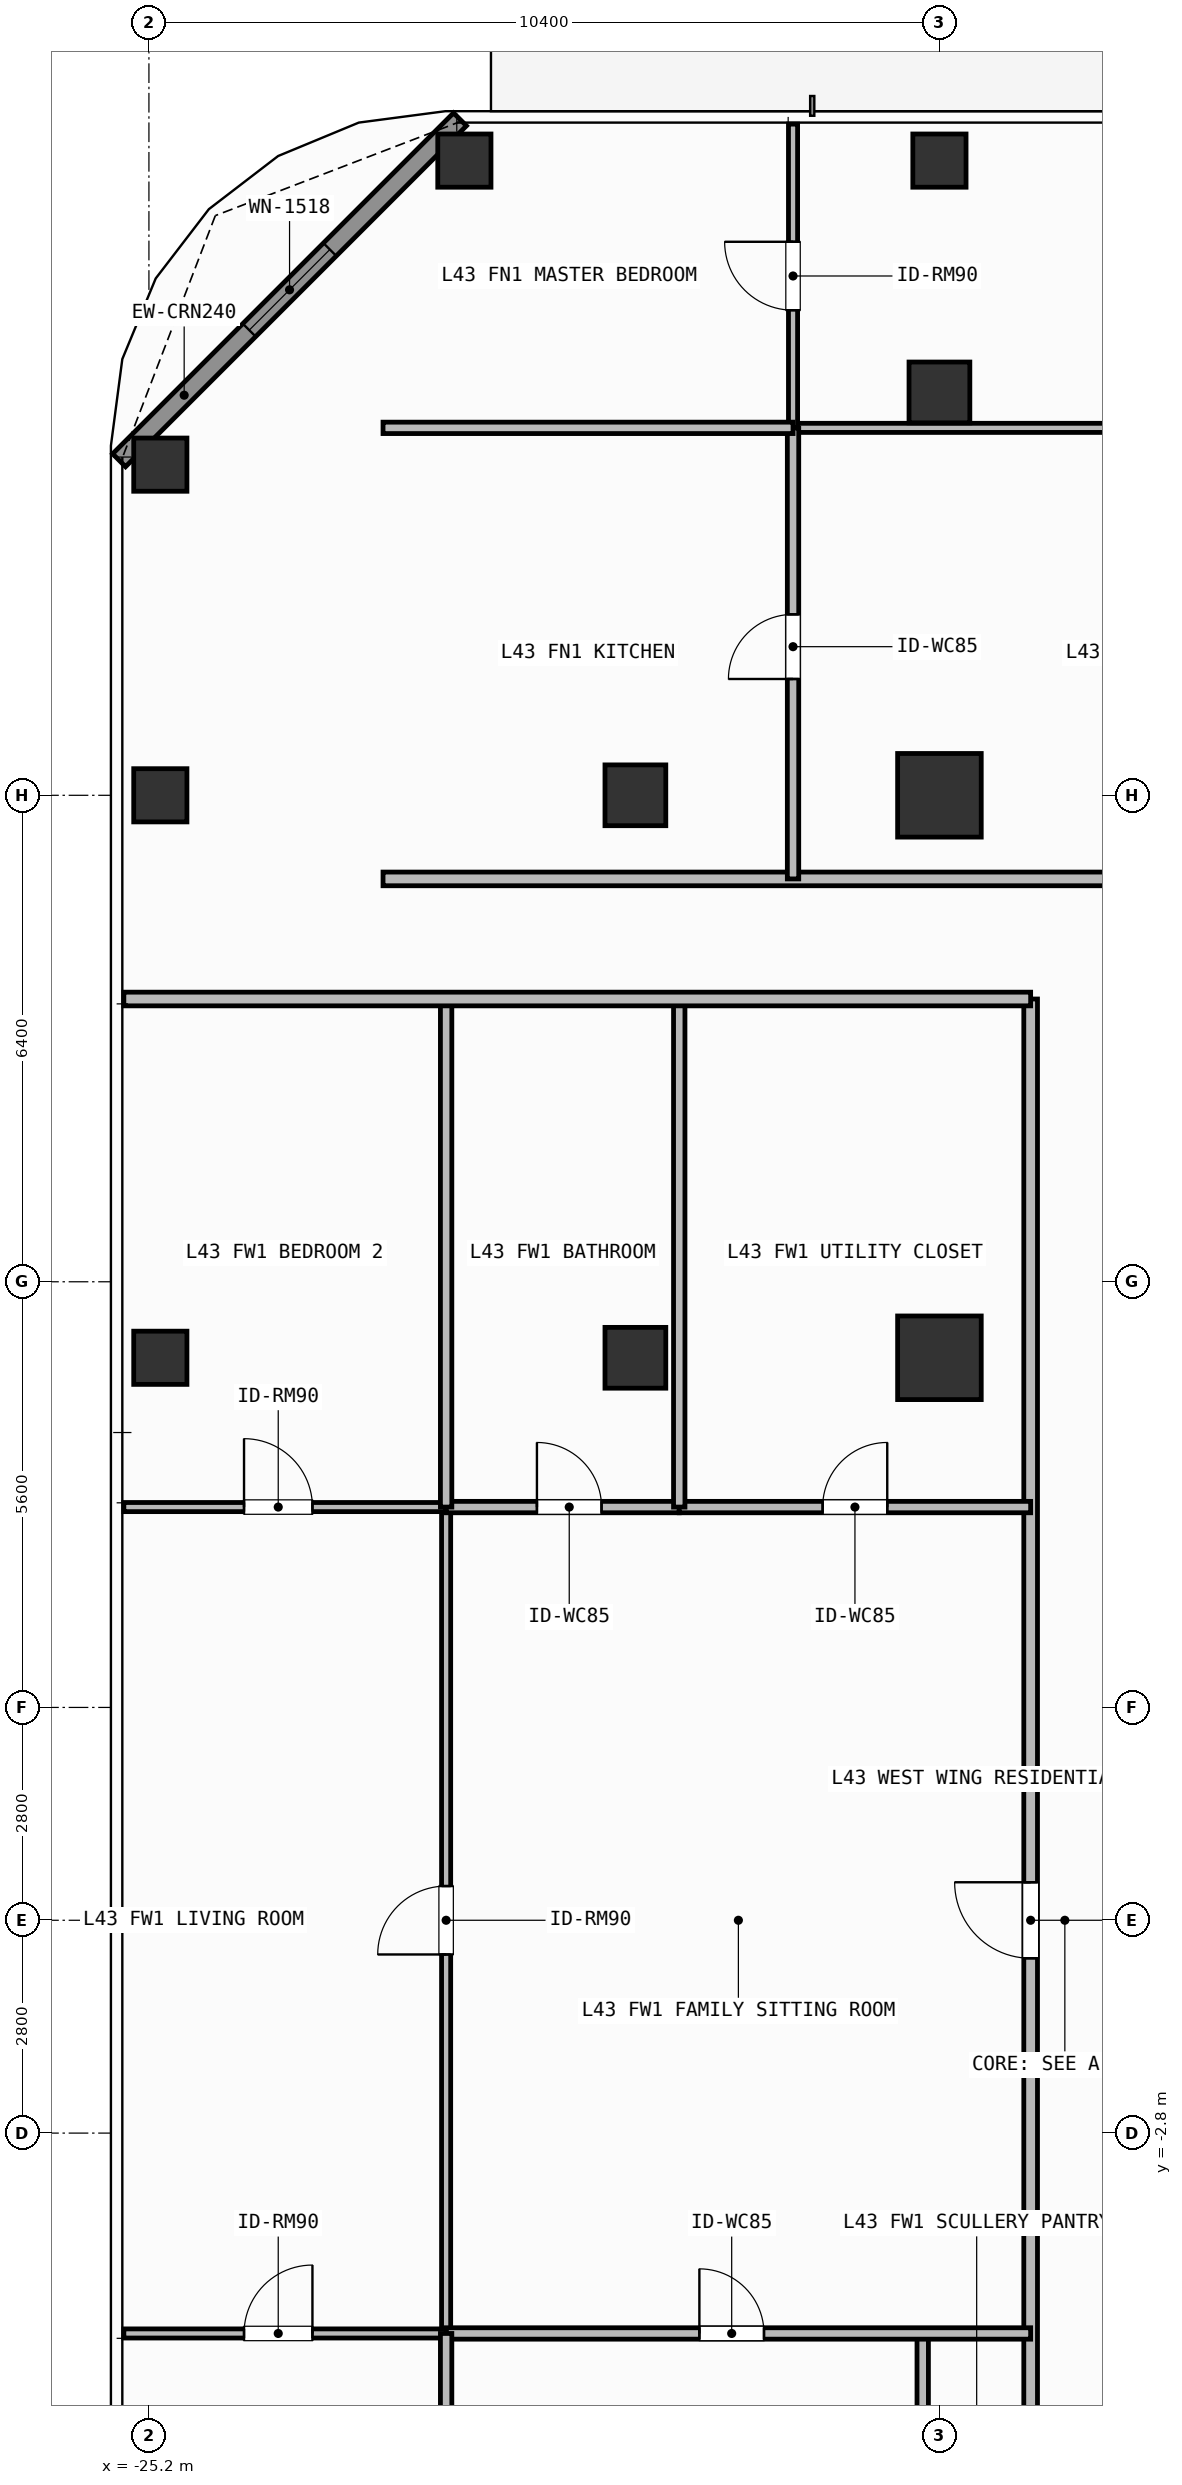
"""IFC4 building model, lengths in metres.
Left out: names, types, materials, properties, quantities, classifications, styles, units other than length and angle.
Written with IfcOpenShell. Run it as: python <this file> out.ifc"""

import sys

from ifc_helpers import new_model, si_unit, direction, frame, frame_2d, origin, origin_2d, place, context, subcontext, project, spatial, rectangle, hollow_rectangle, extrude, element, fill, save


model = new_model("IFC4")
c1 = context("Model", 3, precision=1e-05, world=origin(), true_north=direction((0.0, 1.0)))
c2 = subcontext(c1, "Body", "Model", "MODEL_VIEW")
j1 = project(units=[si_unit("LENGTHUNIT", "METRE"), si_unit("PLANEANGLEUNIT", "RADIAN")], contexts=[c1])
p1 = place(None, origin())
s1 = spatial("IfcSite", under=j1, at=p1, CompositionType="ELEMENT")
p2 = place(p1, origin())
s2 = spatial("IfcBuilding", under=s1, at=p2, CompositionType="ELEMENT")
p3 = place(p2, frame((0.0, 0.0, 175.8)))
s3 = spatial("IfcBuildingStorey", under=s2, at=p3, CompositionType="ELEMENT", Elevation=175.8)
for number, where, z_axis, x_axis in (
    (1, (-14.8, 14.8, 0.0), (0.0, 0.0, 1.0), (1.0, 0.0, 0.0)),
    (2, (-14.8, 7.4, 0.0), (0.0, 0.0, 1.0), (1.0, 0.0, 0.0)),
):
    element("IfcColumn", number, at=place(p3, frame(where, z_axis=z_axis, x_axis=x_axis)), inside=s3, PredefinedType="COLUMN", context=c2, shape_type="SweptSolid", body=[
        extrude(rectangle(XDim=1.1, YDim=1.1, at=origin_2d()), origin(), (0.0, 0.0, 1.0), 3.9),
    ])
for number, where, z_axis, x_axis in (
    (3, (-18.8, 7.4, 0.0), (0.0, 0.0, 1.0), (1.0, 0.0, 0.0)),
    (4, (-18.8, 14.8, 0.0), (0.0, 0.0, 1.0), (1.0, 0.0, 0.0)),
    (5, (-14.8, 20.1, 0.0), (0.0, 0.0, 1.0), (1.0, 0.0, 0.0)),
):
    element("IfcColumn", number, at=place(p3, frame(where, z_axis=z_axis, x_axis=x_axis)), inside=s3, PredefinedType="COLUMN", context=c2, shape_type="SweptSolid", body=[
        extrude(hollow_rectangle(XDim=0.8, YDim=0.8, WallThickness=0.036, at=origin_2d()), origin(), (0.0, 0.0, 1.0), 3.9),
    ])
for number, where, z_axis, x_axis in (
    (6, (-21.05, 23.15, 0.0), (0.0, 0.0, 1.0), (1.0, 0.0, 0.0)),
    (7, (-25.05, 19.15, 0.0), (0.0, 0.0, 1.0), (1.0, 0.0, 0.0)),
    (8, (-14.8, 23.15, 0.0), (0.0, 0.0, 1.0), (1.0, 0.0, 0.0)),
    (9, (-25.05, 7.4, 0.0), (0.0, 0.0, 1.0), (1.0, 0.0, 0.0)),
    (10, (-25.05, 14.8, 0.0), (0.0, 0.0, 1.0), (1.0, 0.0, 0.0)),
):
    element("IfcColumn", number, at=place(p3, frame(where, z_axis=z_axis, x_axis=x_axis)), inside=s3, PredefinedType="COLUMN", context=c2, shape_type="SweptSolid", body=[
        extrude(hollow_rectangle(XDim=0.7, YDim=0.7, WallThickness=0.032, at=origin_2d()), origin(), (0.0, 0.0, 1.0), 3.9),
    ])
p4 = place(p3, frame((-25.592, 19.208, 0.0), z_axis=(0.0, 0.0, 1.0), x_axis=(0.707087534163, 0.707126027686, 0.0)))
e11 = element("IfcWall", 11, at=p4, inside=s3, PredefinedType="SOLIDWALL", context=c2, shape_type="SweptSolid", body=[
    extrude(rectangle(XDim=6.342, YDim=0.24, at=frame_2d((3.171, 0.0))), origin(), (0.0, 0.0, 1.0), 3.68),
])
p5 = place(p4, frame((2.421, 0.0, 0.8)))
e12 = element("IfcOpeningElement", 12, at=p5, cuts=e11, PredefinedType="OPENING", context=c2, shape_type="SweptSolid", body=[
    extrude(rectangle(XDim=1.5, YDim=1.85, at=frame_2d((0.75, 0.925))), frame((0.0, 0.13, 0.0), z_axis=(0.0, -1.0, 0.0), x_axis=(1.0, 0.0, 0.0)), (0.0, 0.0, 1.0), 0.26),
])
p6 = place(p3, frame((-22.12, 13.7, 0.0), z_axis=(0.0, 0.0, 1.0), x_axis=(1.0, 0.0, 0.0)))
e13 = element("IfcWall", 13, at=p6, inside=s3, PredefinedType="PARTITIONING", context=c2, shape_type="SweptSolid", body=[
    extrude(rectangle(XDim=22.646, YDim=0.18, at=frame_2d((11.323, 0.0))), origin(), (0.0, 0.0, 1.0), 3.68),
])
p7 = place(p6, frame((10.554, 0.0, 0.0)))
e14 = element("IfcOpeningElement", 14, at=p7, cuts=e13, PredefinedType="OPENING", context=c2, shape_type="SweptSolid", body=[
    extrude(rectangle(XDim=1.0, YDim=2.2, at=frame_2d((0.5, 1.1))), frame((0.0, 0.1, 0.0), z_axis=(0.0, -1.0, 0.0), x_axis=(1.0, 0.0, 0.0)), (0.0, 0.0, 1.0), 0.2),
])
p8 = place(p3, frame((-16.726, 19.634, 0.0), z_axis=(0.0, 0.0, 1.0), x_axis=(1.0, 0.0, 0.0)))
e15 = element("IfcWall", 15, at=p8, inside=s3, PredefinedType="PARTITIONING", context=c2, shape_type="SweptSolid", body=[
    extrude(rectangle(XDim=11.298, YDim=0.12, at=frame_2d((5.649, 0.0))), origin(), (0.0, 0.0, 1.0), 3.68),
])
p9 = place(p8, frame((5.199, 0.0, 0.0)))
e16 = element("IfcOpeningElement", 16, at=p9, cuts=e15, PredefinedType="OPENING", context=c2, shape_type="SweptSolid", body=[
    extrude(rectangle(XDim=0.9, YDim=2.1, at=frame_2d((0.45, 1.05))), frame((0.0, 0.07, 0.0), z_axis=(0.0, -1.0, 0.0), x_axis=(1.0, 0.0, 0.0)), (0.0, 0.0, 1.0), 0.14),
])
p10 = place(p3, frame((-16.726, 13.7, 0.0), z_axis=(0.0, 0.0, 1.0), x_axis=(0.0, 1.0, 0.0)))
e17 = element("IfcWall", 17, at=p10, inside=s3, PredefinedType="PARTITIONING", context=c2, shape_type="SweptSolid", body=[
    extrude(rectangle(XDim=5.934, YDim=0.15, at=frame_2d((2.967, 0.0))), origin(), (0.0, 0.0, 1.0), 3.68),
])
p11 = place(p10, frame((2.63, 0.0, 0.0)))
e18 = element("IfcOpeningElement", 18, at=p11, cuts=e17, PredefinedType="OPENING", context=c2, shape_type="SweptSolid", body=[
    extrude(rectangle(XDim=0.85, YDim=2.1, at=frame_2d((0.425, 1.05))), frame((0.0, 0.085, 0.0), z_axis=(0.0, -1.0, 0.0), x_axis=(1.0, 0.0, 0.0)), (0.0, 0.0, 1.0), 0.17),
])
p12 = place(p3, frame((-16.726, 19.634, 0.0), z_axis=(0.0, 0.0, 1.0), x_axis=(0.0, 1.0, 0.0)))
e19 = element("IfcWall", 19, at=p12, inside=s3, PredefinedType="PARTITIONING", context=c2, shape_type="SweptSolid", body=[
    extrude(rectangle(XDim=3.996, YDim=0.12, at=frame_2d((1.998, 0.0))), origin(), (0.0, 0.0, 1.0), 3.68),
])
p13 = place(p12, frame((1.548, 0.0, 0.0)))
e20 = element("IfcOpeningElement", 20, at=p13, cuts=e19, PredefinedType="OPENING", context=c2, shape_type="SweptSolid", body=[
    extrude(rectangle(XDim=0.9, YDim=2.1, at=frame_2d((0.45, 1.05))), frame((0.0, 0.07, 0.0), z_axis=(0.0, -1.0, 0.0), x_axis=(1.0, 0.0, 0.0)), (0.0, 0.0, 1.0), 0.14),
])
p14 = place(p3, frame((-13.6, -12.12, 0.0), z_axis=(0.0, 0.0, 1.0), x_axis=(0.0, 1.0, 0.0)))
e21 = element("IfcWall", 21, at=p14, inside=s3, PredefinedType="PARTITIONING", context=c2, shape_type="SweptSolid", body=[
    extrude(rectangle(XDim=24.24, YDim=0.18, at=frame_2d((12.12, 0.0))), origin(), (0.0, 0.0, 1.0), 3.68),
])
p15 = place(p14, frame((11.62, 0.0, 0.0)))
e22 = element("IfcOpeningElement", 22, at=p15, cuts=e21, PredefinedType="OPENING", context=c2, shape_type="SweptSolid", body=[
    extrude(rectangle(XDim=1.0, YDim=2.2, at=frame_2d((0.5, 1.1))), frame((0.0, 0.1, 0.0), z_axis=(0.0, -1.0, 0.0), x_axis=(1.0, 0.0, 0.0)), (0.0, 0.0, 1.0), 0.2),
])
p16 = place(p3, frame((-21.29, -5.436, 0.0), z_axis=(0.0, 0.0, 1.0), x_axis=(0.0, 1.0, 0.0)))
e23 = element("IfcWall", 23, at=p16, inside=s3, PredefinedType="PARTITIONING", context=c2, shape_type="SweptSolid", body=[
    extrude(rectangle(XDim=10.872, YDim=0.12, at=frame_2d((5.436, 0.0))), origin(), (0.0, 0.0, 1.0), 3.68),
])
p17 = place(p16, frame((4.986, 0.0, 0.0)))
e24 = element("IfcOpeningElement", 24, at=p17, cuts=e23, PredefinedType="OPENING", context=c2, shape_type="SweptSolid", body=[
    extrude(rectangle(XDim=0.9, YDim=2.1, at=frame_2d((0.45, 1.05))), frame((0.0, 0.07, 0.0), z_axis=(0.0, -1.0, 0.0), x_axis=(1.0, 0.0, 0.0)), (0.0, 0.0, 1.0), 0.14),
])
p18 = place(p3, frame((-15.02, -12.12, 0.0), z_axis=(0.0, 0.0, 1.0), x_axis=(0.0, 1.0, 0.0)))
e25 = element("IfcWall", 25, at=p18, inside=s3, PredefinedType="PARTITIONING", context=c2, shape_type="SweptSolid", body=[
    extrude(rectangle(XDim=6.684, YDim=0.15, at=frame_2d((3.342, 0.0))), origin(), (0.0, 0.0, 1.0), 3.082),
])
p19 = place(p18, frame((2.828, 0.0, 0.0)))
e26 = element("IfcOpeningElement", 26, at=p19, cuts=e25, PredefinedType="OPENING", context=c2, shape_type="SweptSolid", body=[
    extrude(rectangle(XDim=0.85, YDim=2.1, at=frame_2d((0.425, 1.05))), frame((0.0, 0.085, 0.0), z_axis=(0.0, -1.0, 0.0), x_axis=(1.0, 0.0, 0.0)), (0.0, 0.0, 1.0), 0.17),
])
p20 = place(p3, frame((-21.29, 5.436, 0.0), z_axis=(0.0, 0.0, 1.0), x_axis=(1.0, 0.0, 0.0)))
e27 = element("IfcWall", 27, at=p20, inside=s3, PredefinedType="PARTITIONING", context=c2, shape_type="SweptSolid", body=[
    extrude(rectangle(XDim=3.067, YDim=0.15, at=frame_2d((1.534, 0.0))), origin(), (0.0, 0.0, 1.0), 3.68),
])
p21 = place(p20, frame((1.195, 0.0, 0.0)))
e28 = element("IfcOpeningElement", 28, at=p21, cuts=e27, PredefinedType="OPENING", context=c2, shape_type="SweptSolid", body=[
    extrude(rectangle(XDim=0.85, YDim=2.1, at=frame_2d((0.425, 1.05))), frame((0.0, 0.085, 0.0), z_axis=(0.0, -1.0, 0.0), x_axis=(1.0, 0.0, 0.0)), (0.0, 0.0, 1.0), 0.17),
])
p22 = place(p3, frame((-18.223, 5.436, 0.0), z_axis=(0.0, 0.0, 1.0), x_axis=(1.0, 0.0, 0.0)))
e29 = element("IfcWall", 29, at=p22, inside=s3, PredefinedType="PARTITIONING", context=c2, shape_type="SweptSolid", body=[
    extrude(rectangle(XDim=4.623, YDim=0.15, at=frame_2d((2.312, 0.0))), origin(), (0.0, 0.0, 1.0), 3.68),
])
p23 = place(p22, frame((1.886, 0.0, 0.0)))
e30 = element("IfcOpeningElement", 30, at=p23, cuts=e29, PredefinedType="OPENING", context=c2, shape_type="SweptSolid", body=[
    extrude(rectangle(XDim=0.85, YDim=2.1, at=frame_2d((0.425, 1.05))), frame((0.0, 0.085, 0.0), z_axis=(0.0, -1.0, 0.0), x_axis=(1.0, 0.0, 0.0)), (0.0, 0.0, 1.0), 0.17),
])
p24 = place(p3, frame((-21.29, -5.436, 0.0), z_axis=(0.0, 0.0, 1.0), x_axis=(1.0, 0.0, 0.0)))
e31 = element("IfcWall", 31, at=p24, inside=s3, PredefinedType="PARTITIONING", context=c2, shape_type="SweptSolid", body=[
    extrude(rectangle(XDim=7.69, YDim=0.15, at=frame_2d((3.845, 0.0))), origin(), (0.0, 0.0, 1.0), 3.68),
])
p25 = place(p24, frame((3.332, 0.0, 0.0)))
e32 = element("IfcOpeningElement", 32, at=p25, cuts=e31, PredefinedType="OPENING", context=c2, shape_type="SweptSolid", body=[
    extrude(rectangle(XDim=0.85, YDim=2.1, at=frame_2d((0.425, 1.05))), frame((0.0, 0.085, 0.0), z_axis=(0.0, -1.0, 0.0), x_axis=(1.0, 0.0, 0.0)), (0.0, 0.0, 1.0), 0.17),
])
p26 = place(p3, frame((-25.53, -5.436, 0.0), z_axis=(0.0, 0.0, 1.0), x_axis=(1.0, 0.0, 0.0)))
e33 = element("IfcWall", 33, at=p26, inside=s3, PredefinedType="PARTITIONING", context=c2, shape_type="SweptSolid", body=[
    extrude(rectangle(XDim=4.24, YDim=0.12, at=frame_2d((2.12, 0.0))), origin(), (0.0, 0.0, 1.0), 3.68),
])
p27 = place(p26, frame((1.581, 0.0, 0.0)))
e34 = element("IfcOpeningElement", 34, at=p27, cuts=e33, PredefinedType="OPENING", context=c2, shape_type="SweptSolid", body=[
    extrude(rectangle(XDim=0.9, YDim=2.1, at=frame_2d((0.45, 1.05))), frame((0.0, 0.07, 0.0), z_axis=(0.0, -1.0, 0.0), x_axis=(1.0, 0.0, 0.0)), (0.0, 0.0, 1.0), 0.14),
])
p28 = place(p3, frame((-25.53, 5.436, 0.0), z_axis=(0.0, 0.0, 1.0), x_axis=(1.0, 0.0, 0.0)))
e35 = element("IfcWall", 35, at=p28, inside=s3, PredefinedType="PARTITIONING", context=c2, shape_type="SweptSolid", body=[
    extrude(rectangle(XDim=4.24, YDim=0.12, at=frame_2d((2.12, 0.0))), origin(), (0.0, 0.0, 1.0), 3.68),
])
p29 = place(p28, frame((1.581, 0.0, 0.0)))
e36 = element("IfcOpeningElement", 36, at=p29, cuts=e35, PredefinedType="OPENING", context=c2, shape_type="SweptSolid", body=[
    extrude(rectangle(XDim=0.9, YDim=2.1, at=frame_2d((0.45, 1.05))), frame((0.0, 0.07, 0.0), z_axis=(0.0, -1.0, 0.0), x_axis=(1.0, 0.0, 0.0)), (0.0, 0.0, 1.0), 0.14),
])
p30 = place(p3, frame((-22.12, 19.634, 0.0), z_axis=(0.0, 0.0, 1.0), x_axis=(1.0, 0.0, 0.0)))
e37 = element("IfcWall", 37, at=p30, inside=s3, PredefinedType="PARTITIONING", context=c2, shape_type="SweptSolid", body=[
    extrude(rectangle(XDim=5.394, YDim=0.15, at=frame_2d((2.697, 0.0))), origin(), (0.0, 0.0, 1.0), 3.68),
])
for number, where, z_axis, x_axis in (
    (38, (-18.223, 5.436, 0.0), (0.0, 0.0, 1.0), (0.0, 1.0, 0.0)),
    (39, (-21.29, -12.12, 0.0), (0.0, 0.0, 1.0), (0.0, 1.0, 0.0)),
    (40, (-21.29, 5.436, 0.0), (0.0, 0.0, 1.0), (0.0, 1.0, 0.0)),
):
    element("IfcWall", number, at=place(p3, frame(where, z_axis=z_axis, x_axis=x_axis)), inside=s3, PredefinedType="PARTITIONING", context=c2, shape_type="SweptSolid", body=[
        extrude(rectangle(XDim=6.684, YDim=0.15, at=frame_2d((3.342, 0.0))), origin(), (0.0, 0.0, 1.0), 3.68),
    ])
p31 = place(p3, frame((-25.53, 12.12, 0.0), z_axis=(0.0, 0.0, 1.0), x_axis=(1.0, 0.0, 0.0)))
e41 = element("IfcWall", 41, at=p31, inside=s3, PredefinedType="PARTITIONING", context=c2, shape_type="SweptSolid", body=[
    extrude(rectangle(XDim=11.93, YDim=0.18, at=frame_2d((5.965, 0.0))), origin(), (0.0, 0.0, 1.0), 3.68),
])
p32 = place(p5, origin())
e42 = element("IfcWindow", 42, at=p32, inside=s3, PartitioningType="SINGLE_PANEL", PredefinedType="WINDOW", context=c2, shape_type="SweptSolid", body=[
    extrude(rectangle(XDim=1.5, YDim=1.85, at=frame_2d((0.75, 0.925))), frame((0.0, 0.03, 0.0), z_axis=(0.0, -1.0, 0.0), x_axis=(1.0, 0.0, 0.0)), (0.0, 0.0, 1.0), 0.06),
])
fill(e12, e42)
p33 = place(p11, origin())
e43 = element("IfcDoor", 43, at=p33, inside=s3, OperationType="SINGLE_SWING_LEFT", PredefinedType="DOOR", context=c2, shape_type="SweptSolid", body=[
    extrude(rectangle(XDim=0.85, YDim=2.1, at=frame_2d((0.425, 1.05))), frame((0.0, 0.025, 0.0), z_axis=(0.0, -1.0, 0.0), x_axis=(1.0, 0.0, 0.0)), (0.0, 0.0, 1.0), 0.05),
])
fill(e18, e43)
p34 = place(p13, origin())
e44 = element("IfcDoor", 44, at=p34, inside=s3, OperationType="SINGLE_SWING_RIGHT", PredefinedType="DOOR", context=c2, shape_type="SweptSolid", body=[
    extrude(rectangle(XDim=0.9, YDim=2.1, at=frame_2d((0.45, 1.05))), frame((0.0, 0.025, 0.0), z_axis=(0.0, -1.0, 0.0), x_axis=(1.0, 0.0, 0.0)), (0.0, 0.0, 1.0), 0.05),
])
fill(e20, e44)
p35 = place(p15, origin())
e45 = element("IfcDoor", 45, at=p35, inside=s3, OperationType="SINGLE_SWING_RIGHT", PredefinedType="DOOR", context=c2, shape_type="SweptSolid", body=[
    extrude(rectangle(XDim=1.0, YDim=2.2, at=frame_2d((0.5, 1.1))), frame((0.0, 0.025, 0.0), z_axis=(0.0, -1.0, 0.0), x_axis=(1.0, 0.0, 0.0)), (0.0, 0.0, 1.0), 0.05),
])
fill(e22, e45)
p36 = place(p17, origin())
e46 = element("IfcDoor", 46, at=p36, inside=s3, OperationType="SINGLE_SWING_LEFT", PredefinedType="DOOR", context=c2, shape_type="SweptSolid", body=[
    extrude(rectangle(XDim=0.9, YDim=2.1, at=frame_2d((0.45, 1.05))), frame((0.0, 0.025, 0.0), z_axis=(0.0, -1.0, 0.0), x_axis=(1.0, 0.0, 0.0)), (0.0, 0.0, 1.0), 0.05),
])
fill(e24, e46)
p37 = place(p21, origin())
e47 = element("IfcDoor", 47, at=p37, inside=s3, OperationType="SINGLE_SWING_LEFT", PredefinedType="DOOR", context=c2, shape_type="SweptSolid", body=[
    extrude(rectangle(XDim=0.85, YDim=2.1, at=frame_2d((0.425, 1.05))), frame((0.0, 0.025, 0.0), z_axis=(0.0, -1.0, 0.0), x_axis=(1.0, 0.0, 0.0)), (0.0, 0.0, 1.0), 0.05),
])
fill(e28, e47)
p38 = place(p23, origin())
e48 = element("IfcDoor", 48, at=p38, inside=s3, OperationType="SINGLE_SWING_RIGHT", PredefinedType="DOOR", context=c2, shape_type="SweptSolid", body=[
    extrude(rectangle(XDim=0.85, YDim=2.1, at=frame_2d((0.425, 1.05))), frame((0.0, 0.025, 0.0), z_axis=(0.0, -1.0, 0.0), x_axis=(1.0, 0.0, 0.0)), (0.0, 0.0, 1.0), 0.05),
])
fill(e30, e48)
p39 = place(p25, origin())
e49 = element("IfcDoor", 49, at=p39, inside=s3, OperationType="SINGLE_SWING_LEFT", PredefinedType="DOOR", context=c2, shape_type="SweptSolid", body=[
    extrude(rectangle(XDim=0.85, YDim=2.1, at=frame_2d((0.425, 1.05))), frame((0.0, 0.025, 0.0), z_axis=(0.0, -1.0, 0.0), x_axis=(1.0, 0.0, 0.0)), (0.0, 0.0, 1.0), 0.05),
])
fill(e32, e49)
p40 = place(p27, origin())
e50 = element("IfcDoor", 50, at=p40, inside=s3, OperationType="SINGLE_SWING_RIGHT", PredefinedType="DOOR", context=c2, shape_type="SweptSolid", body=[
    extrude(rectangle(XDim=0.9, YDim=2.1, at=frame_2d((0.45, 1.05))), frame((0.0, 0.025, 0.0), z_axis=(0.0, -1.0, 0.0), x_axis=(1.0, 0.0, 0.0)), (0.0, 0.0, 1.0), 0.05),
])
fill(e34, e50)
p41 = place(p29, origin())
e51 = element("IfcDoor", 51, at=p41, inside=s3, OperationType="SINGLE_SWING_LEFT", PredefinedType="DOOR", context=c2, shape_type="SweptSolid", body=[
    extrude(rectangle(XDim=0.9, YDim=2.1, at=frame_2d((0.45, 1.05))), frame((0.0, 0.025, 0.0), z_axis=(0.0, -1.0, 0.0), x_axis=(1.0, 0.0, 0.0)), (0.0, 0.0, 1.0), 0.05),
])
fill(e36, e51)
save(model, sys.argv[1])
